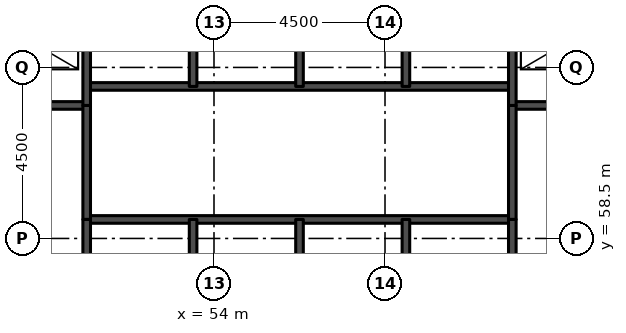
"""IFC4 building model, lengths in metres.
Left out: names, types, materials, properties, quantities, classifications, styles, units other than length and angle.
Written with IfcOpenShell. Run it as: python <this file> out.ifc"""

import sys

from ifc_helpers import new_model, si_unit, direction, frame, frame_2d, origin, place, context, subcontext, project, spatial, rectangle, extrude, element, save


model = new_model("IFC4")
c1 = context("Model", 3, precision=1e-05, world=origin(), true_north=direction((0.0, 1.0)))
c2 = subcontext(c1, "Body", "Model", "MODEL_VIEW")
j1 = project(units=[si_unit("LENGTHUNIT", "METRE"), si_unit("PLANEANGLEUNIT", "RADIAN")], contexts=[c1])
p1 = place(None, origin())
s1 = spatial("IfcSite", under=j1, at=p1, CompositionType="ELEMENT")
p2 = place(p1, origin())
s2 = spatial("IfcBuilding", under=s1, at=p2, CompositionType="ELEMENT")
p3 = place(p2, frame((0.0, 0.0, 36.3)))
s3 = spatial("IfcBuildingStorey", under=s2, at=p3, CompositionType="ELEMENT", Elevation=36.3)
p4 = place(p3, frame((50.65, 59.0, 0.0), z_axis=(0.0, 0.0, 1.0), x_axis=(1.0, 0.0, 0.0)))
e1 = element("IfcWall", 1, at=p4, inside=s3, PredefinedType="SOLIDWALL", context=c2, shape_type="SweptSolid", body=[
    extrude(rectangle(XDim=11.2, YDim=0.2, at=frame_2d((5.6, 0.0))), origin(), (0.0, 0.0, 1.0), 3.3),
])
for number, where, z_axis, x_axis in (
    (2, (45.5, 62.0, 0.0), (0.0, 0.0, 1.0), (1.0, 0.0, 0.0)),
    (3, (61.85, 62.0, 0.0), (0.0, 0.0, 1.0), (1.0, 0.0, 0.0)),
):
    element("IfcWall", number, at=place(p3, frame(where, z_axis=z_axis, x_axis=x_axis)), inside=s3, PredefinedType="SOLIDWALL", context=c2, shape_type="SweptSolid", body=[
        extrude(rectangle(XDim=5.15, YDim=0.2, at=frame_2d((2.575, 0.0))), origin(), (0.0, 0.0, 1.0), 3.08),
    ])
p5 = place(p3, frame((50.65, 62.5, 0.0), z_axis=(0.0, 0.0, 1.0), x_axis=(1.0, 0.0, 0.0)))
e4 = element("IfcWall", 4, at=p5, inside=s3, PredefinedType="SOLIDWALL", context=c2, shape_type="SweptSolid", body=[
    extrude(rectangle(XDim=11.2, YDim=0.2, at=frame_2d((5.6, 0.0))), origin(), (0.0, 0.0, 1.0), 3.3),
])
p6 = place(p3, frame((50.65, 59.0, 0.0), z_axis=(0.0, 0.0, 1.0), x_axis=(0.0, 1.0, 0.0)))
e5 = element("IfcWall", 5, at=p6, inside=s3, PredefinedType="SOLIDWALL", context=c2, shape_type="SweptSolid", body=[
    extrude(rectangle(XDim=3.0, YDim=0.2, at=frame_2d((1.5, 0.0))), origin(), (0.0, 0.0, 1.0), 3.3),
])
p7 = place(p3, frame((50.65, 56.2, 0.0), z_axis=(0.0, 0.0, 1.0), x_axis=(0.0, 1.0, 0.0)))
e6 = element("IfcWall", 6, at=p7, inside=s3, PredefinedType="SOLIDWALL", context=c2, shape_type="SweptSolid", body=[
    extrude(rectangle(XDim=2.8, YDim=0.2, at=frame_2d((1.4, 0.0))), origin(), (0.0, 0.0, 1.0), 3.08),
])
p8 = place(p3, frame((50.65, 62.0, 0.0), z_axis=(0.0, 0.0, 1.0), x_axis=(0.0, 1.0, 0.0)))
e7 = element("IfcWall", 7, at=p8, inside=s3, PredefinedType="SOLIDWALL", context=c2, shape_type="SweptSolid", body=[
    extrude(rectangle(XDim=3.3, YDim=0.2, at=frame_2d((1.65, 0.0))), origin(), (0.0, 0.0, 1.0), 3.08),
])
for number, where, z_axis, x_axis in (
    (8, (53.45, 56.2, 0.0), (0.0, 0.0, 1.0), (0.0, 1.0, 0.0)),
    (9, (53.45, 62.5, 0.0), (0.0, 0.0, 1.0), (0.0, 1.0, 0.0)),
    (10, (56.25, 56.2, 0.0), (0.0, 0.0, 1.0), (0.0, 1.0, 0.0)),
    (11, (56.25, 62.5, 0.0), (0.0, 0.0, 1.0), (0.0, 1.0, 0.0)),
    (12, (59.05, 56.2, 0.0), (0.0, 0.0, 1.0), (0.0, 1.0, 0.0)),
    (13, (59.05, 62.5, 0.0), (0.0, 0.0, 1.0), (0.0, 1.0, 0.0)),
):
    element("IfcWall", number, at=place(p3, frame(where, z_axis=z_axis, x_axis=x_axis)), inside=s3, PredefinedType="SOLIDWALL", context=c2, shape_type="SweptSolid", body=[
        extrude(rectangle(XDim=2.8, YDim=0.2, at=frame_2d((1.4, 0.0))), origin(), (0.0, 0.0, 1.0), 3.08),
    ])
p9 = place(p3, frame((61.85, 59.0, 0.0), z_axis=(0.0, 0.0, 1.0), x_axis=(0.0, 1.0, 0.0)))
e14 = element("IfcWall", 14, at=p9, inside=s3, PredefinedType="SOLIDWALL", context=c2, shape_type="SweptSolid", body=[
    extrude(rectangle(XDim=3.0, YDim=0.2, at=frame_2d((1.5, 0.0))), origin(), (0.0, 0.0, 1.0), 3.3),
])
p10 = place(p3, frame((61.85, 56.2, 0.0), z_axis=(0.0, 0.0, 1.0), x_axis=(0.0, 1.0, 0.0)))
e15 = element("IfcWall", 15, at=p10, inside=s3, PredefinedType="SOLIDWALL", context=c2, shape_type="SweptSolid", body=[
    extrude(rectangle(XDim=2.8, YDim=0.2, at=frame_2d((1.4, 0.0))), origin(), (0.0, 0.0, 1.0), 3.08),
])
p11 = place(p3, frame((61.85, 62.0, 0.0), z_axis=(0.0, 0.0, 1.0), x_axis=(0.0, 1.0, 0.0)))
e16 = element("IfcWall", 16, at=p11, inside=s3, PredefinedType="SOLIDWALL", context=c2, shape_type="SweptSolid", body=[
    extrude(rectangle(XDim=3.3, YDim=0.2, at=frame_2d((1.65, 0.0))), origin(), (0.0, 0.0, 1.0), 3.08),
])
save(model, sys.argv[1])
